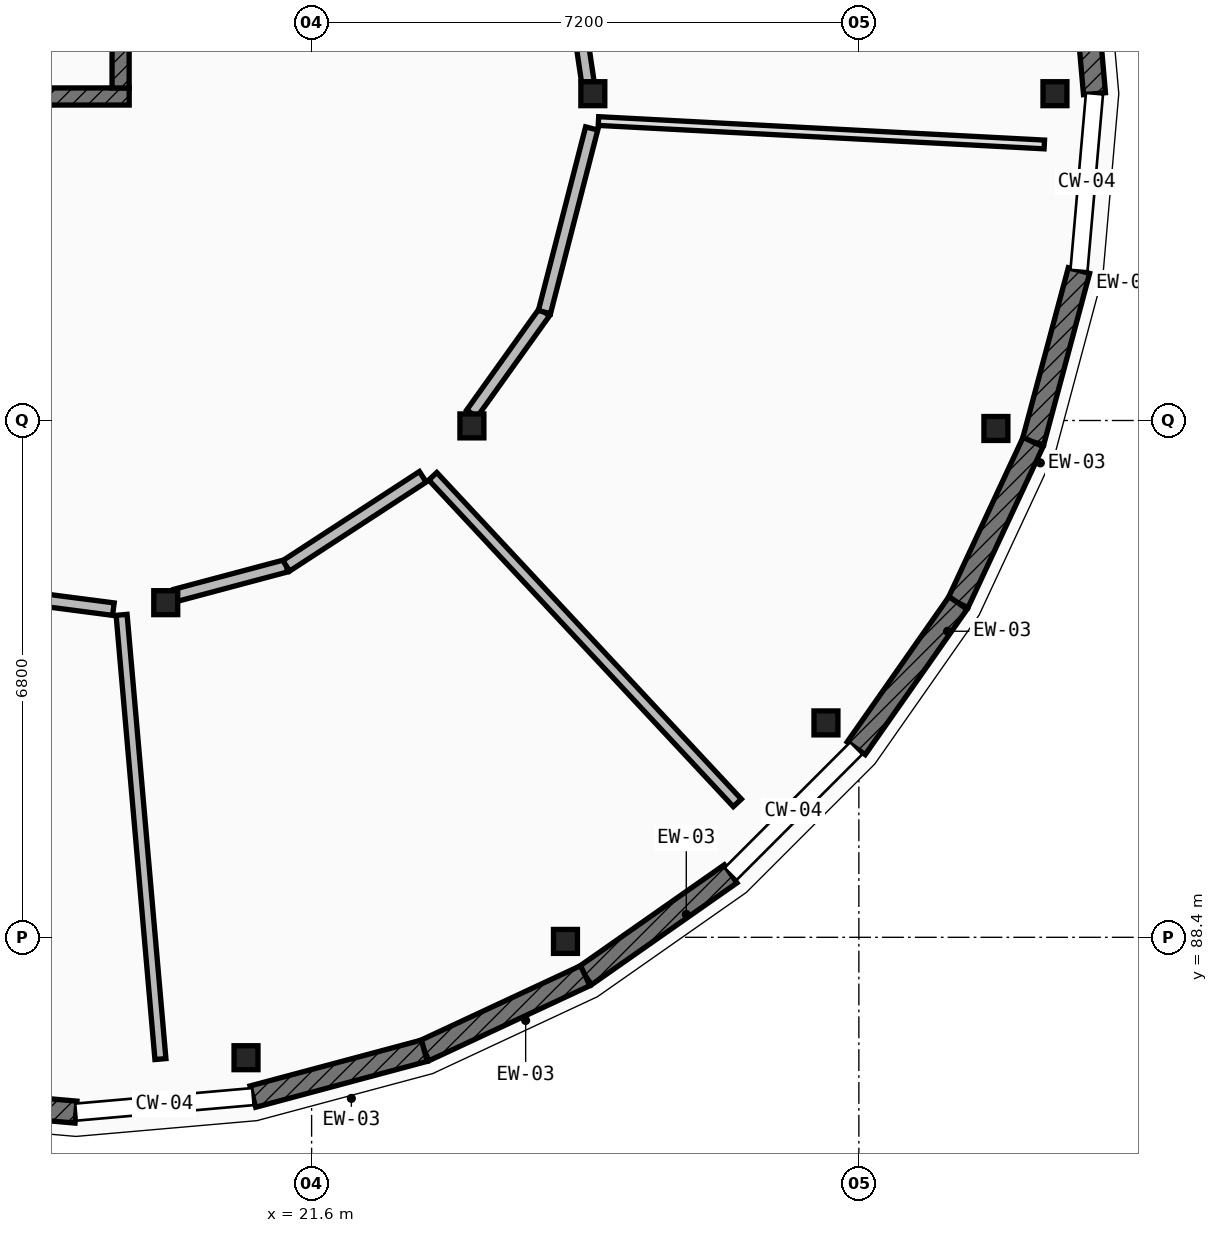
"""IFC4 building model, lengths in metres.
Left out: names, types, materials, properties, quantities, classifications, styles, units other than length and angle.
Written with IfcOpenShell. Run it as: python <this file> out.ifc"""

import sys

from ifc_helpers import new_model, si_unit, direction, frame, frame_2d, origin, origin_2d, place, context, subcontext, project, spatial, rectangle, extrude, element, fill, save


model = new_model("IFC4")
c1 = context("Model", 3, precision=1e-05, world=origin(), true_north=direction((0.0, 1.0)))
c2 = subcontext(c1, "Body", "Model", "MODEL_VIEW")
j1 = project(units=[si_unit("LENGTHUNIT", "METRE"), si_unit("PLANEANGLEUNIT", "RADIAN")], contexts=[c1])
p1 = place(None, origin())
s1 = spatial("IfcSite", under=j1, at=p1, CompositionType="ELEMENT")
p2 = place(p1, origin())
s2 = spatial("IfcBuilding", under=s1, at=p2, CompositionType="ELEMENT")
p3 = place(p2, frame((0.0, 0.0, 12.95)))
s3 = spatial("IfcBuildingStorey", under=s2, at=p3, CompositionType="ELEMENT", Elevation=12.95)
for number, where, z_axis, x_axis in (
    (1, (31.38, 99.5, 0.0), (0.0, 0.0, 1.0), (1.0, 0.0, 0.0)),
    (2, (20.737, 86.816, 0.0), (0.0, 0.0, 1.0), (1.0, 0.0, 0.0)),
    (3, (24.94, 88.346, 0.0), (0.0, 0.0, 1.0), (1.0, 0.0, 0.0)),
    (4, (28.367, 91.221, 0.0), (0.0, 0.0, 1.0), (1.0, 0.0, 0.0)),
    (5, (30.603, 95.095, 0.0), (0.0, 0.0, 1.0), (1.0, 0.0, 0.0)),
    (6, (25.3, 99.5, 0.0), (0.0, 0.0, 1.0), (1.0, 0.0, 0.0)),
    (7, (19.681, 92.803, 0.0), (0.0, 0.0, 1.0), (1.0, 0.0, 0.0)),
    (8, (23.709, 95.129, 0.0), (0.0, 0.0, 1.0), (1.0, 0.0, 0.0)),
):
    element("IfcColumn", number, at=place(p3, frame(where, z_axis=z_axis, x_axis=x_axis)), inside=s3, PredefinedType="COLUMN", context=c2, shape_type="SweptSolid", body=[
        extrude(rectangle(XDim=0.315, YDim=0.315, at=origin_2d()), origin(), (0.0, 0.0, 1.0), 4.2),
    ])
p4 = place(p3, frame((31.696, 97.173, 0.0), z_axis=(0.0, 0.0, 1.0), x_axis=(-0.258612423585, -0.965981166673, 0.0)))
e9 = element("IfcWall", 9, at=p4, inside=s3, PredefinedType="ELEMENTEDWALL", context=c2, shape_type="SweptSolid", body=[
    extrude(rectangle(XDim=2.335, YDim=0.29, at=frame_2d((1.168, 0.0))), origin(), (0.0, 0.0, 1.0), 3.349),
])
p5 = place(p4, frame((0.668, 0.0, 0.85)))
e10 = element("IfcOpeningElement", 10, at=p5, cuts=e9, PredefinedType="OPENING", context=c2, shape_type="SweptSolid", body=[
    extrude(rectangle(XDim=1.0, YDim=1.75, at=frame_2d((0.5, 0.875))), frame((0.0, 0.155, 0.0), z_axis=(0.0, -1.0, 0.0), x_axis=(1.0, 0.0, 0.0)), (0.0, 0.0, 1.0), 0.31),
])
p6 = place(p3, frame((31.092, 94.917, 0.0), z_axis=(0.0, 0.0, 1.0), x_axis=(-0.422587894318, -0.906321946979, 0.0)))
e11 = element("IfcWall", 11, at=p6, inside=s3, PredefinedType="ELEMENTEDWALL", context=c2, shape_type="SweptSolid", body=[
    extrude(rectangle(XDim=2.336, YDim=0.29, at=frame_2d((1.168, 0.0))), origin(), (0.0, 0.0, 1.0), 3.349),
])
p7 = place(p6, frame((0.668, 0.0, 0.85)))
e12 = element("IfcOpeningElement", 12, at=p7, cuts=e11, PredefinedType="OPENING", context=c2, shape_type="SweptSolid", body=[
    extrude(rectangle(XDim=1.0, YDim=2.0, at=frame_2d((0.5, 1.0))), frame((0.0, 0.155, 0.0), z_axis=(0.0, -1.0, 0.0), x_axis=(1.0, 0.0, 0.0)), (0.0, 0.0, 1.0), 0.31),
])
p8 = place(p3, frame((30.105, 92.8, 0.0), z_axis=(0.0, 0.0, 1.0), x_axis=(-0.573728883722, -0.819045278347, 0.0)))
e13 = element("IfcWall", 13, at=p8, inside=s3, PredefinedType="ELEMENTEDWALL", context=c2, shape_type="SweptSolid", body=[
    extrude(rectangle(XDim=2.336, YDim=0.29, at=frame_2d((1.168, 0.0))), origin(), (0.0, 0.0, 1.0), 3.349),
])
p9 = place(p8, frame((0.658, 0.0, 0.85)))
e14 = element("IfcOpeningElement", 14, at=p9, cuts=e13, PredefinedType="OPENING", context=c2, shape_type="SweptSolid", body=[
    extrude(rectangle(XDim=1.02, YDim=1.6, at=frame_2d((0.51, 0.8))), frame((0.0, 0.155, 0.0), z_axis=(0.0, -1.0, 0.0), x_axis=(1.0, 0.0, 0.0)), (0.0, 0.0, 1.0), 0.31),
])
p10 = place(p3, frame((27.113, 89.235, 0.0), z_axis=(0.0, 0.0, 1.0), x_axis=(-0.819045278347, -0.573728883722, 0.0)))
e15 = element("IfcWall", 15, at=p10, inside=s3, PredefinedType="ELEMENTEDWALL", context=c2, shape_type="SweptSolid", body=[
    extrude(rectangle(XDim=2.336, YDim=0.29, at=frame_2d((1.168, 0.0))), origin(), (0.0, 0.0, 1.0), 3.349),
])
p11 = place(p10, frame((0.643, 0.0, 0.85)))
e16 = element("IfcOpeningElement", 16, at=p11, cuts=e15, PredefinedType="OPENING", context=c2, shape_type="SweptSolid", body=[
    extrude(rectangle(XDim=1.05, YDim=1.35, at=frame_2d((0.525, 0.675))), frame((0.0, 0.155, 0.0), z_axis=(0.0, -1.0, 0.0), x_axis=(1.0, 0.0, 0.0)), (0.0, 0.0, 1.0), 0.31),
])
p12 = place(p3, frame((25.2, 87.895, 0.0), z_axis=(0.0, 0.0, 1.0), x_axis=(-0.906321946979, -0.422587894318, 0.0)))
e17 = element("IfcWall", 17, at=p12, inside=s3, PredefinedType="ELEMENTEDWALL", context=c2, shape_type="SweptSolid", body=[
    extrude(rectangle(XDim=2.336, YDim=0.29, at=frame_2d((1.168, 0.0))), origin(), (0.0, 0.0, 1.0), 3.349),
])
p13 = place(p12, frame((0.643, 0.0, 0.85)))
e18 = element("IfcOpeningElement", 18, at=p13, cuts=e17, PredefinedType="OPENING", context=c2, shape_type="SweptSolid", body=[
    extrude(rectangle(XDim=1.05, YDim=1.6, at=frame_2d((0.525, 0.8))), frame((0.0, 0.155, 0.0), z_axis=(0.0, -1.0, 0.0), x_axis=(1.0, 0.0, 0.0)), (0.0, 0.0, 1.0), 0.31),
])
p14 = place(p3, frame((23.083, 86.908, 0.0), z_axis=(0.0, 0.0, 1.0), x_axis=(-0.965981166673, -0.258612423585, 0.0)))
e19 = element("IfcWall", 19, at=p14, inside=s3, PredefinedType="ELEMENTEDWALL", context=c2, shape_type="SweptSolid", body=[
    extrude(rectangle(XDim=2.335, YDim=0.29, at=frame_2d((1.168, 0.0))), origin(), (0.0, 0.0, 1.0), 3.349),
])
p15 = place(p14, frame((0.643, 0.0, 0.85)))
e20 = element("IfcOpeningElement", 20, at=p15, cuts=e19, PredefinedType="OPENING", context=c2, shape_type="SweptSolid", body=[
    extrude(rectangle(XDim=1.05, YDim=1.9, at=frame_2d((0.525, 0.95))), frame((0.0, 0.155, 0.0), z_axis=(0.0, -1.0, 0.0), x_axis=(1.0, 0.0, 0.0)), (0.0, 0.0, 1.0), 0.31),
])
p16 = place(p3, frame((18.5, 86.1, 0.0), z_axis=(0.0, 0.0, 1.0), x_axis=(-0.996184295282, 0.087274565792, 0.0)))
e21 = element("IfcWall", 21, at=p16, inside=s3, PredefinedType="ELEMENTEDWALL", context=c2, shape_type="SweptSolid", body=[
    extrude(rectangle(XDim=2.336, YDim=0.29, at=frame_2d((1.168, 0.0))), origin(), (0.0, 0.0, 1.0), 3.349),
])
p17 = place(p16, frame((0.643, 0.0, 0.85)))
e22 = element("IfcOpeningElement", 22, at=p17, cuts=e21, PredefinedType="OPENING", context=c2, shape_type="SweptSolid", body=[
    extrude(rectangle(XDim=1.05, YDim=2.15, at=frame_2d((0.525, 1.075))), frame((0.0, 0.155, 0.0), z_axis=(0.0, -1.0, 0.0), x_axis=(1.0, 0.0, 0.0)), (0.0, 0.0, 1.0), 0.31),
])
p18 = place(p3, frame((31.696, 101.827, 0.0), z_axis=(0.0, 0.0, 1.0), x_axis=(0.087274565792, -0.996184295282, 0.0)))
e23 = element("IfcWall", 23, at=p18, inside=s3, PredefinedType="ELEMENTEDWALL", context=c2, shape_type="SweptSolid", body=[
    extrude(rectangle(XDim=2.336, YDim=0.29, at=frame_2d((1.168, 0.0))), origin(), (0.0, 0.0, 1.0), 3.349),
])
p19 = place(p18, frame((0.568, 0.0, 0.85)))
e24 = element("IfcOpeningElement", 24, at=p19, cuts=e23, PredefinedType="OPENING", context=c2, shape_type="SweptSolid", body=[
    extrude(rectangle(XDim=1.2, YDim=1.95, at=frame_2d((0.6, 0.975))), frame((0.0, 0.155, 0.0), z_axis=(0.0, -1.0, 0.0), x_axis=(1.0, 0.0, 0.0)), (0.0, 0.0, 1.0), 0.31),
])
p20 = place(p3, frame((16.1, 99.463, 0.0), z_axis=(0.0, 0.0, 1.0), x_axis=(1.0, 0.0, 0.0)))
e25 = element("IfcWall", 25, at=p20, inside=s3, PredefinedType="SHEAR", context=c2, shape_type="SweptSolid", body=[
    extrude(rectangle(XDim=3.1, YDim=0.225, at=frame_2d((1.55, 0.0))), origin(), (0.0, 0.0, 1.0), 3.995),
])
p21 = place(p20, frame((0.95, 0.0, 0.0)))
e26 = element("IfcOpeningElement", 26, at=p21, cuts=e25, PredefinedType="OPENING", context=c2, shape_type="SweptSolid", body=[
    extrude(rectangle(XDim=1.2, YDim=2.2, at=frame_2d((0.6, 1.1))), frame((0.0, 0.123, 0.0), z_axis=(0.0, -1.0, 0.0), x_axis=(1.0, 0.0, 0.0)), (0.0, 0.0, 1.0), 0.245),
])
p22 = place(p3, frame((19.087, 99.575, 0.0), z_axis=(0.0, 0.0, 1.0), x_axis=(0.0, 1.0, 0.0)))
e27 = element("IfcWall", 27, at=p22, inside=s3, PredefinedType="SHEAR", context=c2, shape_type="SweptSolid", body=[
    extrude(rectangle(XDim=2.15, YDim=0.225, at=frame_2d((1.075, 0.0))), origin(), (0.0, 0.0, 1.0), 3.995),
])
p23 = place(p3, frame((19.1, 92.643, 0.0), z_axis=(0.0, 0.0, 1.0), x_axis=(0.087091071421, -0.996200353984, 0.0)))
e28 = element("IfcWall", 28, at=p23, inside=s3, PredefinedType="PARTITIONING", context=c2, shape_type="SweptSolid", body=[
    extrude(rectangle(XDim=5.867, YDim=0.145, at=frame_2d((2.934, 0.0))), origin(), (0.0, 0.0, 1.0), 3.324),
])
p24 = place(p3, frame((23.194, 94.466, 0.0), z_axis=(0.0, 0.0, 1.0), x_axis=(0.681971732264, -0.731378531537, 0.0)))
e29 = element("IfcWall", 29, at=p24, inside=s3, PredefinedType="PARTITIONING", context=c2, shape_type="SweptSolid", body=[
    extrude(rectangle(XDim=5.875, YDim=0.145, at=frame_2d((2.938, 0.0))), origin(), (0.0, 0.0, 1.0), 3.324),
])
p25 = place(p3, frame((25.374, 99.14, 0.0), z_axis=(0.0, 0.0, 1.0), x_axis=(0.998625625662, -0.052410492944, 0.0)))
e30 = element("IfcWall", 30, at=p25, inside=s3, PredefinedType="PARTITIONING", context=c2, shape_type="SweptSolid", body=[
    extrude(rectangle(XDim=5.874, YDim=0.115, at=frame_2d((2.937, 0.0))), origin(), (0.0, 0.0, 1.0), 3.324),
])
p26 = place(p3, frame((16.286, 93.07, 0.0), z_axis=(0.0, 0.0, 1.0), x_axis=(0.991643260492, -0.12901024735, 0.0)))
e31 = element("IfcWall", 31, at=p26, inside=s3, PredefinedType="PARTITIONING", context=c2, shape_type="SweptSolid", body=[
    extrude(rectangle(XDim=2.729, YDim=0.165, at=frame_2d((1.364, 0.0))), origin(), (0.0, 0.0, 1.0), 3.324),
])
p27 = place(p3, frame((19.811, 92.9, 0.0), z_axis=(0.0, 0.0, 1.0), x_axis=(0.966208027206, 0.257763550882, 0.0)))
e32 = element("IfcWall", 32, at=p27, inside=s3, PredefinedType="PARTITIONING", context=c2, shape_type="SweptSolid", body=[
    extrude(rectangle(XDim=1.506, YDim=0.165, at=frame_2d((0.753, 0.0))), origin(), (0.0, 0.0, 1.0), 3.324),
])
p28 = place(p27, frame((0.293, 0.0, 0.0)))
e33 = element("IfcOpeningElement", 33, at=p28, cuts=e32, PredefinedType="OPENING", context=c2, shape_type="SweptSolid", body=[
    extrude(rectangle(XDim=0.92, YDim=2.12, at=frame_2d((0.46, 1.06))), frame((0.0, 0.093, 0.0), z_axis=(0.0, -1.0, 0.0), x_axis=(1.0, 0.0, 0.0)), (0.0, 0.0, 1.0), 0.185),
])
p29 = place(p3, frame((21.266, 93.288, 0.0), z_axis=(0.0, 0.0, 1.0), x_axis=(0.837818879473, 0.5459482807, 0.0)))
e34 = element("IfcWall", 34, at=p29, inside=s3, PredefinedType="PARTITIONING", context=c2, shape_type="SweptSolid", body=[
    extrude(rectangle(XDim=2.145, YDim=0.165, at=frame_2d((1.072, 0.0))), origin(), (0.0, 0.0, 1.0), 3.324),
])
p30 = place(p3, frame((23.708, 95.291, 0.0), z_axis=(0.0, 0.0, 1.0), x_axis=(0.581857090846, 0.813291046202, 0.0)))
e35 = element("IfcWall", 35, at=p30, inside=s3, PredefinedType="PARTITIONING", context=c2, shape_type="SweptSolid", body=[
    extrude(rectangle(XDim=1.641, YDim=0.165, at=frame_2d((0.821, 0.0))), origin(), (0.0, 0.0, 1.0), 3.324),
])
p31 = place(p30, frame((0.341, 0.0, 0.0)))
e36 = element("IfcOpeningElement", 36, at=p31, cuts=e35, PredefinedType="OPENING", context=c2, shape_type="SweptSolid", body=[
    extrude(rectangle(XDim=0.96, YDim=2.12, at=frame_2d((0.48, 1.06))), frame((0.0, 0.093, 0.0), z_axis=(0.0, -1.0, 0.0), x_axis=(1.0, 0.0, 0.0)), (0.0, 0.0, 1.0), 0.185),
])
p32 = place(p3, frame((24.663, 96.626, 0.0), z_axis=(0.0, 0.0, 1.0), x_axis=(0.249159011618, 0.968462589329, 0.0)))
e37 = element("IfcWall", 37, at=p32, inside=s3, PredefinedType="PARTITIONING", context=c2, shape_type="SweptSolid", body=[
    extrude(rectangle(XDim=2.496, YDim=0.165, at=frame_2d((1.248, 0.0))), origin(), (0.0, 0.0, 1.0), 3.324),
])
p33 = place(p3, frame((25.235, 99.649, 0.0), z_axis=(0.0, 0.0, 1.0), x_axis=(-0.14618415224, 0.989257395036, 0.0)))
e38 = element("IfcWall", 38, at=p33, inside=s3, PredefinedType="PARTITIONING", context=c2, shape_type="SweptSolid", body=[
    extrude(rectangle(XDim=2.088, YDim=0.165, at=frame_2d((1.044, 0.0))), origin(), (0.0, 0.0, 1.0), 3.324),
])
p34 = place(p33, frame((0.604, 0.0, 0.0)))
e39 = element("IfcOpeningElement", 39, at=p34, cuts=e38, PredefinedType="OPENING", context=c2, shape_type="SweptSolid", body=[
    extrude(rectangle(XDim=0.88, YDim=2.1, at=frame_2d((0.44, 1.05))), frame((0.0, 0.093, 0.0), z_axis=(0.0, -1.0, 0.0), x_axis=(1.0, 0.0, 0.0)), (0.0, 0.0, 1.0), 0.185),
])
p35 = place(p5, origin())
e40 = element("IfcWindow", 40, at=p35, inside=s3, PartitioningType="SINGLE_PANEL", PredefinedType="WINDOW", context=c2, shape_type="SweptSolid", body=[
    extrude(rectangle(XDim=1.0, YDim=1.75, at=frame_2d((0.5, 0.875))), frame((0.0, 0.03, 0.0), z_axis=(0.0, -1.0, 0.0), x_axis=(1.0, 0.0, 0.0)), (0.0, 0.0, 1.0), 0.06),
])
fill(e10, e40)
p36 = place(p7, origin())
e41 = element("IfcWindow", 41, at=p36, inside=s3, PartitioningType="SINGLE_PANEL", PredefinedType="WINDOW", context=c2, shape_type="SweptSolid", body=[
    extrude(rectangle(XDim=1.0, YDim=2.0, at=frame_2d((0.5, 1.0))), frame((0.0, 0.03, 0.0), z_axis=(0.0, -1.0, 0.0), x_axis=(1.0, 0.0, 0.0)), (0.0, 0.0, 1.0), 0.06),
])
fill(e12, e41)
p37 = place(p9, origin())
e42 = element("IfcWindow", 42, at=p37, inside=s3, PartitioningType="SINGLE_PANEL", PredefinedType="WINDOW", context=c2, shape_type="SweptSolid", body=[
    extrude(rectangle(XDim=1.02, YDim=1.6, at=frame_2d((0.51, 0.8))), frame((0.0, 0.03, 0.0), z_axis=(0.0, -1.0, 0.0), x_axis=(1.0, 0.0, 0.0)), (0.0, 0.0, 1.0), 0.06),
])
fill(e14, e42)
p38 = place(p11, origin())
e43 = element("IfcWindow", 43, at=p38, inside=s3, PartitioningType="SINGLE_PANEL", PredefinedType="WINDOW", context=c2, shape_type="SweptSolid", body=[
    extrude(rectangle(XDim=1.05, YDim=1.35, at=frame_2d((0.525, 0.675))), frame((0.0, 0.03, 0.0), z_axis=(0.0, -1.0, 0.0), x_axis=(1.0, 0.0, 0.0)), (0.0, 0.0, 1.0), 0.06),
])
fill(e16, e43)
p39 = place(p13, origin())
e44 = element("IfcWindow", 44, at=p39, inside=s3, PartitioningType="SINGLE_PANEL", PredefinedType="WINDOW", context=c2, shape_type="SweptSolid", body=[
    extrude(rectangle(XDim=1.05, YDim=1.6, at=frame_2d((0.525, 0.8))), frame((0.0, 0.03, 0.0), z_axis=(0.0, -1.0, 0.0), x_axis=(1.0, 0.0, 0.0)), (0.0, 0.0, 1.0), 0.06),
])
fill(e18, e44)
p40 = place(p15, origin())
e45 = element("IfcWindow", 45, at=p40, inside=s3, PartitioningType="SINGLE_PANEL", PredefinedType="WINDOW", context=c2, shape_type="SweptSolid", body=[
    extrude(rectangle(XDim=1.05, YDim=1.9, at=frame_2d((0.525, 0.95))), frame((0.0, 0.03, 0.0), z_axis=(0.0, -1.0, 0.0), x_axis=(1.0, 0.0, 0.0)), (0.0, 0.0, 1.0), 0.06),
])
fill(e20, e45)
p41 = place(p21, origin())
e46 = element("IfcDoor", 46, at=p41, inside=s3, OperationType="DOUBLE_DOOR_SLIDING", PredefinedType="DOOR", context=c2, shape_type="SweptSolid", body=[
    extrude(rectangle(XDim=1.2, YDim=2.2, at=frame_2d((0.6, 1.1))), frame((0.0, 0.025, 0.0), z_axis=(0.0, -1.0, 0.0), x_axis=(1.0, 0.0, 0.0)), (0.0, 0.0, 1.0), 0.05),
])
fill(e26, e46)
p42 = place(p28, origin())
e47 = element("IfcDoor", 47, at=p42, inside=s3, OperationType="SINGLE_SWING_LEFT", PredefinedType="DOOR", context=c2, shape_type="SweptSolid", body=[
    extrude(rectangle(XDim=0.92, YDim=2.12, at=frame_2d((0.46, 1.06))), frame((0.0, 0.025, 0.0), z_axis=(0.0, -1.0, 0.0), x_axis=(1.0, 0.0, 0.0)), (0.0, 0.0, 1.0), 0.05),
])
fill(e33, e47)
p43 = place(p31, origin())
e48 = element("IfcDoor", 48, at=p43, inside=s3, OperationType="SINGLE_SWING_RIGHT", PredefinedType="DOOR", context=c2, shape_type="SweptSolid", body=[
    extrude(rectangle(XDim=0.96, YDim=2.12, at=frame_2d((0.48, 1.06))), frame((0.0, 0.025, 0.0), z_axis=(0.0, -1.0, 0.0), x_axis=(1.0, 0.0, 0.0)), (0.0, 0.0, 1.0), 0.05),
])
fill(e36, e48)
save(model, sys.argv[1])
